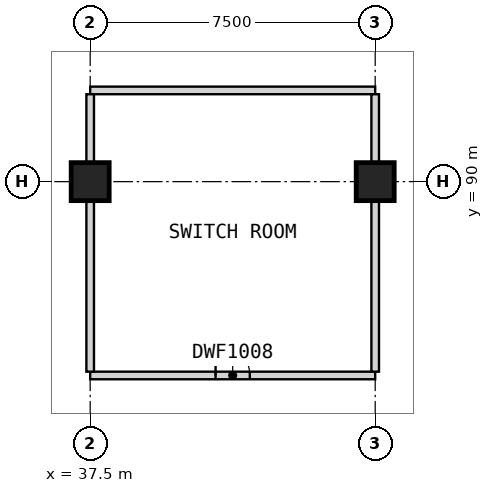
"""IFC4 building model, lengths in metres.
Left out: names, types, materials, properties, quantities, classifications, styles, units other than length and angle.
Written with IfcOpenShell. Run it as: python <this file> out.ifc"""

import sys

from ifc_helpers import new_model, si_unit, direction, frame, frame_2d, origin, origin_2d, place, context, subcontext, project, spatial, rectangle, extrude, element, fill, save


model = new_model("IFC4")
c1 = context("Model", 3, precision=1e-05, world=origin(), true_north=direction((0.0, 1.0)))
c2 = subcontext(c1, "Body", "Model", "MODEL_VIEW")
j1 = project(units=[si_unit("LENGTHUNIT", "METRE"), si_unit("PLANEANGLEUNIT", "RADIAN")], contexts=[c1])
p1 = place(None, origin())
s1 = spatial("IfcSite", under=j1, at=p1, CompositionType="ELEMENT")
p2 = place(p1, origin())
s2 = spatial("IfcBuilding", under=s1, at=p2, CompositionType="ELEMENT")
p3 = place(p2, frame((0.0, 0.0, 166.2)))
s3 = spatial("IfcBuildingStorey", under=s2, at=p3, CompositionType="ELEMENT", Elevation=166.2)
for number, where, z_axis, x_axis in (
    (1, (37.5, 90.0, 0.0), (0.0, 0.0, 1.0), (1.0, 0.0, 0.0)),
    (2, (45.0, 90.0, 0.0), (0.0, 0.0, 1.0), (1.0, 0.0, 0.0)),
):
    element("IfcColumn", number, at=place(p3, frame(where, z_axis=z_axis, x_axis=x_axis)), inside=s3, PredefinedType="COLUMN", context=c2, shape_type="SweptSolid", body=[
        extrude(rectangle(XDim=1.0, YDim=1.0, at=origin_2d()), origin(), (0.0, 0.0, 1.0), 8.0),
    ])
p4 = place(p3, frame((37.5, 84.9, 0.0), z_axis=(0.0, 0.0, 1.0), x_axis=(1.0, 0.0, 0.0)))
e3 = element("IfcWall", 3, at=p4, inside=s3, PredefinedType="PARTITIONING", context=c2, shape_type="SweptSolid", body=[
    extrude(rectangle(XDim=7.5, YDim=0.2, at=frame_2d((3.75, 0.0))), origin(), (0.0, 0.0, 1.0), 7.7),
])
p5 = place(p4, frame((3.3, 0.0, 0.0)))
e4 = element("IfcOpeningElement", 4, at=p5, cuts=e3, PredefinedType="OPENING", context=c2, shape_type="SweptSolid", body=[
    extrude(rectangle(XDim=0.9, YDim=2.1, at=frame_2d((0.45, 1.05))), frame((0.0, 0.11, 0.0), z_axis=(0.0, -1.0, 0.0), x_axis=(1.0, 0.0, 0.0)), (0.0, 0.0, 1.0), 0.22),
])
p6 = place(p3, frame((37.5, 92.4, 0.0), z_axis=(0.0, 0.0, 1.0), x_axis=(1.0, 0.0, 0.0)))
e5 = element("IfcWall", 5, at=p6, inside=s3, PredefinedType="PARTITIONING", context=c2, shape_type="SweptSolid", body=[
    extrude(rectangle(XDim=7.5, YDim=0.2, at=frame_2d((3.75, 0.0))), origin(), (0.0, 0.0, 1.0), 7.7),
])
for number, where, z_axis, x_axis in (
    (6, (37.5, 85.0, 0.0), (0.0, 0.0, 1.0), (0.0, 1.0, 0.0)),
    (7, (45.0, 85.0, 0.0), (0.0, 0.0, 1.0), (0.0, 1.0, 0.0)),
):
    element("IfcWall", number, at=place(p3, frame(where, z_axis=z_axis, x_axis=x_axis)), inside=s3, PredefinedType="PARTITIONING", context=c2, shape_type="SweptSolid", body=[
        extrude(rectangle(XDim=7.3, YDim=0.2, at=frame_2d((3.65, 0.0))), origin(), (0.0, 0.0, 1.0), 7.7),
    ])
p7 = place(p5, origin())
e8 = element("IfcDoor", 8, at=p7, inside=s3, OperationType="SINGLE_SWING_LEFT", PredefinedType="DOOR", context=c2, shape_type="SweptSolid", body=[
    extrude(rectangle(XDim=0.9, YDim=2.1, at=frame_2d((0.45, 1.05))), frame((0.0, 0.025, 0.0), z_axis=(0.0, -1.0, 0.0), x_axis=(1.0, 0.0, 0.0)), (0.0, 0.0, 1.0), 0.05),
])
fill(e4, e8)
save(model, sys.argv[1])
